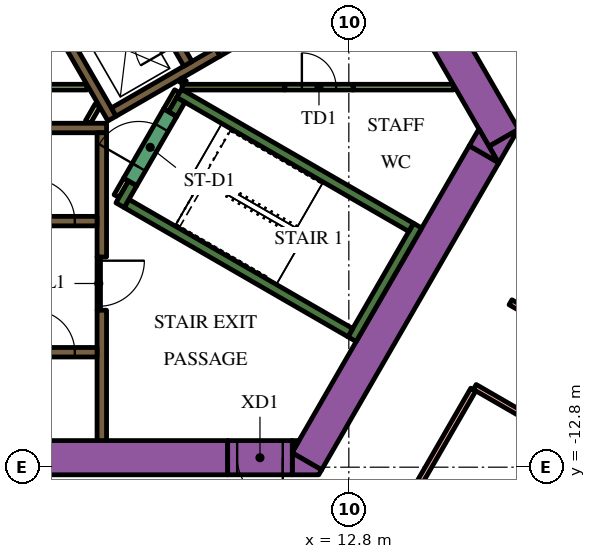
"""IFC4 building model, lengths in metres.
Left out: names, types, materials, properties, quantities, classifications, styles, units other than length and angle.
Written with IfcOpenShell. Run it as: python <this file> out.ifc"""

import sys

from ifc_helpers import new_model, si_unit, direction, frame, frame_2d, origin, place, context, subcontext, project, spatial, polyline, rectangle, outline, extrude, element, fill, save


model = new_model("IFC4")
c1 = context("Model", 3, precision=1e-05, world=origin(), true_north=direction((0.0, 1.0)))
c2 = subcontext(c1, "Body", "Model", "MODEL_VIEW")
j1 = project(units=[si_unit("LENGTHUNIT", "METRE"), si_unit("PLANEANGLEUNIT", "RADIAN")], contexts=[c1])
p1 = place(None, origin())
s1 = spatial("IfcSite", under=j1, at=p1, CompositionType="ELEMENT")
p2 = place(p1, origin())
s2 = spatial("IfcBuilding", under=s1, at=p2, CompositionType="ELEMENT")
p3 = place(p2, frame((0.0, 0.0, 134.4)))
s3 = spatial("IfcBuildingStorey", under=s2, at=p3, CompositionType="ELEMENT", Elevation=134.4)
p4 = place(p3, frame((6.776, 13.364, 0.0), z_axis=(0.0, 0.0, 1.0), x_axis=(0.500004177138, -0.8660229921, 0.0)))
e1 = element("IfcWall", 1, at=p4, inside=s3, PredefinedType="SOLIDWALL", context=c2, shape_type="SweptSolid", body=[
    extrude(rectangle(XDim=20.204, YDim=0.9, at=frame_2d((10.102, 0.0))), origin(), (0.0, 0.0, 1.0), 7.2),
])
p5 = place(p3, origin())
e2 = element("IfcWall", 2, at=p5, inside=s3, PredefinedType="SOLIDWALL", context=c2, shape_type="SweptSolid", body=[
    extrude(outline(polyline([(16.743, -4.8), (16.489, -4.36), (17.251, -3.92), (16.743, -4.8)])), origin(), (0.0, 0.0, 1.0), 7.2),
])
p6 = place(p3, frame((11.695, -12.644, 0.0), z_axis=(0.0, 0.0, 1.0), x_axis=(0.500010229568, 0.86601949766, 0.0)))
e3 = element("IfcWall", 3, at=p6, inside=s3, PredefinedType="SOLIDWALL", context=c2, shape_type="SweptSolid", body=[
    extrude(rectangle(XDim=9.326, YDim=0.9, at=frame_2d((4.663, 0.0))), origin(), (0.0, 0.0, 1.0), 7.2),
])
e4 = element("IfcWall", 4, at=p5, inside=s3, PredefinedType="SOLIDWALL", context=c2, shape_type="SweptSolid", body=[
    extrude(outline(polyline([(12.009, -13.0), (11.312, -13.0), (11.312, -12.425), (12.083, -12.871), (12.009, -13.0)])), origin(), (0.0, 0.0, 1.0), 7.2),
])
e5 = element("IfcWall", 5, at=p5, inside=s3, PredefinedType="SOLIDWALL", context=c2, shape_type="SweptSolid", body=[
    extrude(outline(polyline([(16.223, -3.9), (16.732, -4.78), (15.969, -4.34), (16.223, -3.9)])), origin(), (0.0, 0.0, 1.0), 7.2),
])
e6 = element("IfcWall", 6, at=p5, inside=s3, PredefinedType="SOLIDWALL", context=c2, shape_type="SweptSolid", body=[
    extrude(outline(polyline([(11.489, -12.1), (11.312, -12.407), (11.312, -12.1), (11.489, -12.1)])), origin(), (0.0, 0.0, 1.0), 7.2),
])
p7 = place(p3, frame((-12.019, -12.55, 0.0), z_axis=(0.0, 0.0, 1.0), x_axis=(1.0, 0.0, 0.0)))
e7 = element("IfcWall", 7, at=p7, inside=s3, PredefinedType="SOLIDWALL", context=c2, shape_type="SweptSolid", body=[
    extrude(rectangle(XDim=21.63, YDim=0.9, at=frame_2d((10.815, 0.0))), origin(), (0.0, 0.0, 1.0), 7.2),
])
p8 = place(p3, frame((12.885, -9.431, 0.0), z_axis=(0.0, 0.0, 1.0), x_axis=(0.500020560727, 0.866013532718, 0.0)))
e8 = element("IfcWall", 8, at=p8, inside=s3, PredefinedType="SOLIDWALL", context=c2, shape_type="SweptSolid", body=[
    extrude(rectangle(XDim=3.45, YDim=0.25, at=frame_2d((1.725, 0.0))), origin(), (0.0, 0.0, 1.0), 7.2),
])
p9 = place(p3, frame((12.84, -9.261, 0.0), z_axis=(0.0, 0.0, 1.0), x_axis=(-0.866013990052, 0.500019768644, 0.0)))
e9 = element("IfcWall", 9, at=p9, inside=s3, PredefinedType="SOLIDWALL", context=c2, shape_type="SweptSolid", body=[
    extrude(rectangle(XDim=6.8, YDim=0.25, at=frame_2d((3.4, 0.0))), origin(), (0.0, 0.0, 1.0), 7.2),
])
p10 = place(p3, frame((7.113, -5.33, 0.0), z_axis=(0.0, 0.0, 1.0), x_axis=(-0.499965889992, -0.866045096311, 0.0)))
e10 = element("IfcWall", 10, at=p10, inside=s3, PredefinedType="SOLIDWALL", context=c2, shape_type="SweptSolid", body=[
    extrude(rectangle(XDim=0.666, YDim=0.25, at=frame_2d((0.333, 0.0))), origin(), (0.0, 0.0, 1.0), 7.2),
])
p11 = place(p3, frame((8.334, -2.964, 0.0), z_axis=(0.0, 0.0, 1.0), x_axis=(0.866016039709, -0.500016218704, 0.0)))
e11 = element("IfcWall", 11, at=p11, inside=s3, PredefinedType="SOLIDWALL", context=c2, shape_type="SweptSolid", body=[
    extrude(rectangle(XDim=7.05, YDim=0.25, at=frame_2d((3.525, 0.0))), origin(), (0.0, 0.0, 1.0), 7.2),
])
p12 = place(p3, frame((8.163, -3.511, 0.0), z_axis=(0.0, 0.0, 1.0), x_axis=(0.500127794843, 0.865951608824, 0.0)))
e12 = element("IfcWall", 12, at=p12, inside=s3, PredefinedType="SOLIDWALL", context=c2, shape_type="SweptSolid", body=[
    extrude(rectangle(XDim=0.435, YDim=0.25, at=frame_2d((0.217, 0.0))), origin(), (0.0, 0.0, 1.0), 7.2),
])
p13 = place(p3, frame((-6.19, -3.875, 0.0), z_axis=(0.0, 0.0, 1.0), x_axis=(1.0, 0.0, 0.0)))
e13 = element("IfcWall", 13, at=p13, inside=s3, PredefinedType="SOLIDWALL", context=c2, shape_type="SweptSolid", body=[
    extrude(rectangle(XDim=12.615, YDim=0.25, at=frame_2d((6.307, 0.0))), origin(), (0.0, 0.0, 1.0), 7.2),
])
p14 = place(p3, frame((6.3, -8.67, 0.0), z_axis=(0.0, 0.0, 1.0), x_axis=(0.0, -1.0, 0.0)))
e14 = element("IfcWall", 14, at=p14, inside=s3, PredefinedType="SOLIDWALL", context=c2, shape_type="SweptSolid", body=[
    extrude(rectangle(XDim=3.43, YDim=0.25, at=frame_2d((1.715, 0.0))), origin(), (0.0, 0.0, 1.0), 7.2),
])
p15 = place(p3, frame((6.3, -7.268, 0.0), z_axis=(0.0, 0.0, 1.0), x_axis=(0.0, 1.0, 0.0)))
e15 = element("IfcWall", 15, at=p15, inside=s3, PredefinedType="SOLIDWALL", context=c2, shape_type="SweptSolid", body=[
    extrude(rectangle(XDim=3.268, YDim=0.25, at=frame_2d((1.634, 0.0))), origin(), (0.0, 0.0, 1.0), 7.2),
])
e16 = element("IfcWall", 16, at=p5, inside=s3, PredefinedType="SOLIDWALL", context=c2, shape_type="SweptSolid", body=[
    extrude(outline(polyline([(0.335, 6.925), (0.335, 6.925), (0.335, 7.075), (0.335, 7.075), (0.335, 7.075), (0.245, 7.075), (0.035, 7.439), (0.252, 7.564), (0.377, 7.348), (1.512, 5.382), (1.637, 5.165), (2.221, 4.153), (2.771, 3.199), (2.896, 2.983), (3.138, 2.564), (4.031, 1.017), (4.156, 0.801), (5.292, -1.165), (5.417, -1.382), (6.073, -2.519), (6.552, -3.348), (6.677, -3.564), (6.46, -3.689), (0.332, 6.925), (0.335, 6.925), (0.335, 6.925)])), origin(), (0.0, 0.0, 1.0), 7.2),
])
p16 = place(p3, frame((9.352, -1.875, 0.0), z_axis=(0.0, 0.0, 1.0), x_axis=(-0.866024844342, -0.500000968981, 0.0)))
e17 = element("IfcWall", 17, at=p16, inside=s3, PredefinedType="SOLIDWALL", context=c2, shape_type="SweptSolid", body=[
    extrude(rectangle(XDim=3.162, YDim=0.25, at=frame_2d((1.581, 0.0))), origin(), (0.0, 0.0, 1.0), 7.2),
])
p17 = place(p3, frame((6.688, -5.667, 0.0), z_axis=(0.0, 0.0, 1.0), x_axis=(0.499834152157, 0.86612113491, 0.0)))
e18 = element("IfcWall", 18, at=p17, inside=s3, PredefinedType="PARTITIONING", context=c2, shape_type="SweptSolid", body=[
    extrude(rectangle(XDim=0.505, YDim=0.15, at=frame_2d((0.252, 0.0))), origin(), (0.0, 0.0, 1.0), 6.15),
])
p18 = place(p3, frame((5.936, -3.718, 0.0), z_axis=(0.0, 0.0, 1.0), x_axis=(0.499890179513, 0.866088799389, 0.0)))
e19 = element("IfcWall", 19, at=p18, inside=s3, PredefinedType="PARTITIONING", context=c2, shape_type="SweptSolid", body=[
    extrude(rectangle(XDim=0.504, YDim=0.15, at=frame_2d((0.252, 0.0))), origin(), (0.0, 0.0, 1.0), 6.15),
])
p19 = place(p3, frame((8.412, -2.8, 0.0), z_axis=(0.0, 0.0, 1.0), x_axis=(1.0, 0.0, 0.0)))
e20 = element("IfcWall", 20, at=p19, inside=s3, PredefinedType="PARTITIONING", context=c2, shape_type="SweptSolid", body=[
    extrude(rectangle(XDim=2.702, YDim=0.15, at=frame_2d((1.351, 0.0))), origin(), (0.0, 0.0, 1.0), 7.2),
])
p20 = place(p3, frame((8.459, -2.599, 0.0), z_axis=(0.0, 0.0, 1.0), x_axis=(-0.501919277433, -0.864914469148, 0.0)))
e21 = element("IfcWall", 21, at=p20, inside=s3, PredefinedType="PARTITIONING", context=c2, shape_type="SweptSolid", body=[
    extrude(rectangle(XDim=0.109, YDim=0.15, at=frame_2d((0.054, 0.0))), origin(), (0.0, 0.0, 1.0), 7.2),
])
p21 = place(p3, frame((8.281, -2.907, 0.0), z_axis=(0.0, 0.0, 1.0), x_axis=(-0.500193841991, -0.86591346013, 0.0)))
e22 = element("IfcWall", 22, at=p21, inside=s3, PredefinedType="PARTITIONING", context=c2, shape_type="SweptSolid", body=[
    extrude(rectangle(XDim=0.583, YDim=0.15, at=frame_2d((0.292, 0.0))), origin(), (0.0, 0.0, 1.0), 7.2),
])
p22 = place(p3, frame((3.238, -2.8, 0.0), z_axis=(0.0, 0.0, 1.0), x_axis=(1.0, 0.0, 0.0)))
e23 = element("IfcWall", 23, at=p22, inside=s3, PredefinedType="PARTITIONING", context=c2, shape_type="SweptSolid", body=[
    extrude(rectangle(XDim=2.672, YDim=0.15, at=frame_2d((1.336, 0.0))), origin(), (0.0, 0.0, 1.0), 6.15),
])
p23 = place(p3, frame((12.915, -2.8, 0.0), z_axis=(0.0, 0.0, 1.0), x_axis=(1.0, 0.0, 0.0)))
e24 = element("IfcWall", 24, at=p23, inside=s3, PredefinedType="PARTITIONING", context=c2, shape_type="SweptSolid", body=[
    extrude(rectangle(XDim=2.637, YDim=0.15, at=frame_2d((1.318, 0.0))), origin(), (0.0, 0.0, 1.0), 6.15),
])
p24 = place(p3, frame((-6.175, -9.775, 0.0), z_axis=(0.0, 0.0, 1.0), x_axis=(1.0, 0.0, 0.0)))
e25 = element("IfcWall", 25, at=p24, inside=s3, PredefinedType="SOLIDWALL", context=c2, shape_type="SweptSolid", body=[
    extrude(rectangle(XDim=12.35, YDim=0.25, at=frame_2d((6.175, 0.0))), origin(), (0.0, 0.0, 1.0), 7.2),
])
p25 = place(p24, frame((0.585, 0.0, 0.0)))
e26 = element("IfcOpeningElement", 26, at=p25, cuts=e25, PredefinedType="OPENING", context=c2, shape_type="SweptSolid", body=[
    extrude(rectangle(XDim=1.1, YDim=2.1, at=frame_2d((0.55, 1.05))), frame((0.0, 0.135, 0.0), z_axis=(0.0, -1.0, 0.0), x_axis=(1.0, 0.0, 0.0)), (0.0, 0.0, 1.0), 0.27),
])
p26 = place(p24, frame((3.105, 0.0, 0.0)))
e27 = element("IfcOpeningElement", 27, at=p26, cuts=e25, PredefinedType="OPENING", context=c2, shape_type="SweptSolid", body=[
    extrude(rectangle(XDim=1.1, YDim=2.1, at=frame_2d((0.55, 1.05))), frame((0.0, 0.135, 0.0), z_axis=(0.0, -1.0, 0.0), x_axis=(1.0, 0.0, 0.0)), (0.0, 0.0, 1.0), 0.27),
])
p27 = place(p24, frame((5.625, 0.0, 0.0)))
e28 = element("IfcOpeningElement", 28, at=p27, cuts=e25, PredefinedType="OPENING", context=c2, shape_type="SweptSolid", body=[
    extrude(rectangle(XDim=1.1, YDim=2.1, at=frame_2d((0.55, 1.05))), frame((0.0, 0.135, 0.0), z_axis=(0.0, -1.0, 0.0), x_axis=(1.0, 0.0, 0.0)), (0.0, 0.0, 1.0), 0.27),
])
p28 = place(p24, frame((8.145, 0.0, 0.0)))
e29 = element("IfcOpeningElement", 29, at=p28, cuts=e25, PredefinedType="OPENING", context=c2, shape_type="SweptSolid", body=[
    extrude(rectangle(XDim=1.1, YDim=2.1, at=frame_2d((0.55, 1.05))), frame((0.0, 0.135, 0.0), z_axis=(0.0, -1.0, 0.0), x_axis=(1.0, 0.0, 0.0)), (0.0, 0.0, 1.0), 0.27),
])
p29 = place(p24, frame((10.665, 0.0, 0.0)))
e30 = element("IfcOpeningElement", 30, at=p29, cuts=e25, PredefinedType="OPENING", context=c2, shape_type="SweptSolid", body=[
    extrude(rectangle(XDim=1.1, YDim=2.1, at=frame_2d((0.55, 1.05))), frame((0.0, 0.135, 0.0), z_axis=(0.0, -1.0, 0.0), x_axis=(1.0, 0.0, 0.0)), (0.0, 0.0, 1.0), 0.27),
])
p30 = place(p3, frame((-6.175, -6.325, 0.0), z_axis=(0.0, 0.0, 1.0), x_axis=(1.0, 0.0, 0.0)))
e31 = element("IfcWall", 31, at=p30, inside=s3, PredefinedType="SOLIDWALL", context=c2, shape_type="SweptSolid", body=[
    extrude(rectangle(XDim=12.35, YDim=0.25, at=frame_2d((6.175, 0.0))), origin(), (0.0, 0.0, 1.0), 7.2),
])
p31 = place(p30, frame((0.585, 0.0, 0.0)))
e32 = element("IfcOpeningElement", 32, at=p31, cuts=e31, PredefinedType="OPENING", context=c2, shape_type="SweptSolid", body=[
    extrude(rectangle(XDim=1.1, YDim=2.1, at=frame_2d((0.55, 1.05))), frame((0.0, 0.135, 0.0), z_axis=(0.0, -1.0, 0.0), x_axis=(1.0, 0.0, 0.0)), (0.0, 0.0, 1.0), 0.27),
])
p32 = place(p30, frame((3.105, 0.0, 0.0)))
e33 = element("IfcOpeningElement", 33, at=p32, cuts=e31, PredefinedType="OPENING", context=c2, shape_type="SweptSolid", body=[
    extrude(rectangle(XDim=1.1, YDim=2.1, at=frame_2d((0.55, 1.05))), frame((0.0, 0.135, 0.0), z_axis=(0.0, -1.0, 0.0), x_axis=(1.0, 0.0, 0.0)), (0.0, 0.0, 1.0), 0.27),
])
p33 = place(p30, frame((5.625, 0.0, 0.0)))
e34 = element("IfcOpeningElement", 34, at=p33, cuts=e31, PredefinedType="OPENING", context=c2, shape_type="SweptSolid", body=[
    extrude(rectangle(XDim=1.1, YDim=2.1, at=frame_2d((0.55, 1.05))), frame((0.0, 0.135, 0.0), z_axis=(0.0, -1.0, 0.0), x_axis=(1.0, 0.0, 0.0)), (0.0, 0.0, 1.0), 0.27),
])
p34 = place(p30, frame((8.145, 0.0, 0.0)))
e35 = element("IfcOpeningElement", 35, at=p34, cuts=e31, PredefinedType="OPENING", context=c2, shape_type="SweptSolid", body=[
    extrude(rectangle(XDim=1.1, YDim=2.1, at=frame_2d((0.55, 1.05))), frame((0.0, 0.135, 0.0), z_axis=(0.0, -1.0, 0.0), x_axis=(1.0, 0.0, 0.0)), (0.0, 0.0, 1.0), 0.27),
])
p35 = place(p30, frame((10.665, 0.0, 0.0)))
e36 = element("IfcOpeningElement", 36, at=p35, cuts=e31, PredefinedType="OPENING", context=c2, shape_type="SweptSolid", body=[
    extrude(rectangle(XDim=1.1, YDim=2.1, at=frame_2d((0.55, 1.05))), frame((0.0, 0.135, 0.0), z_axis=(0.0, -1.0, 0.0), x_axis=(1.0, 0.0, 0.0)), (0.0, 0.0, 1.0), 0.27),
])
p36 = place(p3, frame((8.565, -2.185, 0.0), z_axis=(0.0, 0.0, 1.0), x_axis=(-0.499997954832, 0.866026584559, 0.0)))
e37 = element("IfcWall", 37, at=p36, inside=s3, PredefinedType="SOLIDWALL", context=c2, shape_type="SweptSolid", body=[
    extrude(rectangle(XDim=12.35, YDim=0.25, at=frame_2d((6.175, 0.0))), origin(), (0.0, 0.0, 1.0), 7.2),
])
p37 = place(p36, frame((0.585, 0.0, 0.0)))
e38 = element("IfcOpeningElement", 38, at=p37, cuts=e37, PredefinedType="OPENING", context=c2, shape_type="SweptSolid", body=[
    extrude(rectangle(XDim=1.1, YDim=2.1, at=frame_2d((0.55, 1.05))), frame((0.0, 0.135, 0.0), z_axis=(0.0, -1.0, 0.0), x_axis=(1.0, 0.0, 0.0)), (0.0, 0.0, 1.0), 0.27),
])
p38 = place(p36, frame((3.105, 0.0, 0.0)))
e39 = element("IfcOpeningElement", 39, at=p38, cuts=e37, PredefinedType="OPENING", context=c2, shape_type="SweptSolid", body=[
    extrude(rectangle(XDim=1.1, YDim=2.1, at=frame_2d((0.55, 1.05))), frame((0.0, 0.135, 0.0), z_axis=(0.0, -1.0, 0.0), x_axis=(1.0, 0.0, 0.0)), (0.0, 0.0, 1.0), 0.27),
])
p39 = place(p36, frame((5.625, 0.0, 0.0)))
e40 = element("IfcOpeningElement", 40, at=p39, cuts=e37, PredefinedType="OPENING", context=c2, shape_type="SweptSolid", body=[
    extrude(rectangle(XDim=1.1, YDim=2.1, at=frame_2d((0.55, 1.05))), frame((0.0, 0.135, 0.0), z_axis=(0.0, -1.0, 0.0), x_axis=(1.0, 0.0, 0.0)), (0.0, 0.0, 1.0), 0.27),
])
p40 = place(p36, frame((8.145, 0.0, 0.0)))
e41 = element("IfcOpeningElement", 41, at=p40, cuts=e37, PredefinedType="OPENING", context=c2, shape_type="SweptSolid", body=[
    extrude(rectangle(XDim=1.1, YDim=2.1, at=frame_2d((0.55, 1.05))), frame((0.0, 0.135, 0.0), z_axis=(0.0, -1.0, 0.0), x_axis=(1.0, 0.0, 0.0)), (0.0, 0.0, 1.0), 0.27),
])
p41 = place(p36, frame((10.665, 0.0, 0.0)))
e42 = element("IfcOpeningElement", 42, at=p41, cuts=e37, PredefinedType="OPENING", context=c2, shape_type="SweptSolid", body=[
    extrude(rectangle(XDim=1.1, YDim=2.1, at=frame_2d((0.55, 1.05))), frame((0.0, 0.135, 0.0), z_axis=(0.0, -1.0, 0.0), x_axis=(1.0, 0.0, 0.0)), (0.0, 0.0, 1.0), 0.27),
])
p42 = place(p3, frame((7.048, -5.292, 0.0), z_axis=(0.0, 0.0, 1.0), x_axis=(0.49994051562, 0.866059744384, 0.0)))
e43 = element("IfcWall", 43, at=p42, inside=s3, PredefinedType="SOLIDWALL", context=c2, shape_type="SweptSolid", body=[
    extrude(rectangle(XDim=2.1, YDim=0.4, at=frame_2d((1.05, 0.0))), origin(), (0.0, 0.0, 1.0), 7.2),
])
p43 = place(p42, frame((0.45, 0.0, 0.0)))
e44 = element("IfcOpeningElement", 44, at=p43, cuts=e43, PredefinedType="OPENING", context=c2, shape_type="SweptSolid", body=[
    extrude(rectangle(XDim=1.2, YDim=2.1, at=frame_2d((0.6, 1.05))), frame((0.0, 0.21, 0.0), z_axis=(0.0, -1.0, 0.0), x_axis=(1.0, 0.0, 0.0)), (0.0, 0.0, 1.0), 0.42),
])
p44 = place(p3, frame((6.22, -7.266, 0.0), z_axis=(0.0, 0.0, 1.0), x_axis=(0.0, -1.0, 0.0)))
e45 = element("IfcWall", 45, at=p44, inside=s3, PredefinedType="PARTITIONING", context=c2, shape_type="SweptSolid", body=[
    extrude(rectangle(XDim=1.4, YDim=0.09, at=frame_2d((0.7, 0.0))), origin(), (0.0, 0.0, 1.0), 6.15),
])
p45 = place(p44, frame((0.1, 0.0, 0.0)))
e46 = element("IfcOpeningElement", 46, at=p45, cuts=e45, PredefinedType="OPENING", context=c2, shape_type="SweptSolid", body=[
    extrude(rectangle(XDim=1.2, YDim=2.1, at=frame_2d((0.6, 1.05))), frame((0.0, 0.055, 0.0), z_axis=(0.0, -1.0, 0.0), x_axis=(1.0, 0.0, 0.0)), (0.0, 0.0, 1.0), 0.11),
])
p46 = place(p3, frame((11.312, -12.55, 0.0), z_axis=(0.0, 0.0, 1.0), x_axis=(-1.0, 0.0, 0.0)))
e47 = element("IfcWall", 47, at=p46, inside=s3, PredefinedType="SOLIDWALL", context=c2, shape_type="SweptSolid", body=[
    extrude(rectangle(XDim=1.7, YDim=0.9, at=frame_2d((0.85, 0.0))), origin(), (0.0, 0.0, 1.0), 7.2),
])
p47 = place(p46, frame((0.25, 0.0, 0.0)))
e48 = element("IfcOpeningElement", 48, at=p47, cuts=e47, PredefinedType="OPENING", context=c2, shape_type="SweptSolid", body=[
    extrude(rectangle(XDim=1.2, YDim=2.1, at=frame_2d((0.6, 1.05))), frame((0.0, 0.46, 0.0), z_axis=(0.0, -1.0, 0.0), x_axis=(1.0, 0.0, 0.0)), (0.0, 0.0, 1.0), 0.92),
])
p48 = place(p3, frame((9.352, -1.875, 0.0), z_axis=(0.0, 0.0, 1.0), x_axis=(0.865989075817, 0.500062916607, 0.0)))
e49 = element("IfcWall", 49, at=p48, inside=s3, PredefinedType="SOLIDWALL", context=c2, shape_type="SweptSolid", body=[
    extrude(rectangle(XDim=1.8, YDim=0.25, at=frame_2d((0.9, 0.0))), origin(), (0.0, 0.0, 1.0), 7.2),
])
p49 = place(p48, frame((0.45, 0.0, 0.0)))
e50 = element("IfcOpeningElement", 50, at=p49, cuts=e49, PredefinedType="OPENING", context=c2, shape_type="SweptSolid", body=[
    extrude(rectangle(XDim=0.9, YDim=2.1, at=frame_2d((0.45, 1.05))), frame((0.0, 0.135, 0.0), z_axis=(0.0, -1.0, 0.0), x_axis=(1.0, 0.0, 0.0)), (0.0, 0.0, 1.0), 0.27),
])
p50 = place(p3, frame((11.115, -2.8, 0.0), z_axis=(0.0, 0.0, 1.0), x_axis=(1.0, 0.0, 0.0)))
e51 = element("IfcWall", 51, at=p50, inside=s3, PredefinedType="PARTITIONING", context=c2, shape_type="SweptSolid", body=[
    extrude(rectangle(XDim=1.8, YDim=0.15, at=frame_2d((0.9, 0.0))), origin(), (0.0, 0.0, 1.0), 6.15),
])
p51 = place(p50, frame((0.45, 0.0, 0.0)))
e52 = element("IfcOpeningElement", 52, at=p51, cuts=e51, PredefinedType="OPENING", context=c2, shape_type="SweptSolid", body=[
    extrude(rectangle(XDim=0.9, YDim=2.1, at=frame_2d((0.45, 1.05))), frame((0.0, 0.085, 0.0), z_axis=(0.0, -1.0, 0.0), x_axis=(1.0, 0.0, 0.0)), (0.0, 0.0, 1.0), 0.17),
])
p52 = place(p3, frame((20.034, -3.9, 0.0), z_axis=(0.0, 0.0, 1.0), x_axis=(-0.500006098403, 0.866021882841, 0.0)))
e53 = element("IfcWall", 53, at=p52, inside=s3, PredefinedType="PARTITIONING", context=c2, shape_type="SweptSolid", body=[
    extrude(rectangle(XDim=22.774, YDim=0.15, at=frame_2d((11.387, 0.0))), origin(), (0.0, 0.0, 1.0), 6.15),
])
p53 = place(p52, frame((10.487, 0.0, 0.0)))
e54 = element("IfcOpeningElement", 54, at=p53, cuts=e53, PredefinedType="OPENING", context=c2, shape_type="SweptSolid", body=[
    extrude(rectangle(XDim=1.8, YDim=2.1, at=frame_2d((0.9, 1.05))), frame((0.0, 0.085, 0.0), z_axis=(0.0, -1.0, 0.0), x_axis=(1.0, 0.0, 0.0)), (0.0, 0.0, 1.0), 0.17),
])
p54 = place(p52, frame((7.377, 0.0, 0.0)))
e55 = element("IfcOpeningElement", 55, at=p54, cuts=e53, PredefinedType="OPENING", context=c2, shape_type="SweptSolid", body=[
    extrude(rectangle(XDim=1.8, YDim=2.1, at=frame_2d((0.9, 1.05))), frame((0.0, 0.085, 0.0), z_axis=(0.0, -1.0, 0.0), x_axis=(1.0, 0.0, 0.0)), (0.0, 0.0, 1.0), 0.17),
])
p55 = place(p3, frame((16.114, -10.689, 0.0), z_axis=(0.0, 0.0, 1.0), x_axis=(0.866025427251, -0.499999959354, 0.0)))
e56 = element("IfcWall", 56, at=p55, inside=s3, PredefinedType="PARTITIONING", context=c2, shape_type="SweptSolid", body=[
    extrude(rectangle(XDim=13.099, YDim=0.15, at=frame_2d((6.549, 0.0))), origin(), (0.0, 0.0, 1.0), 6.15),
])
p56 = place(p55, frame((5.649, 0.0, 0.0)))
e57 = element("IfcOpeningElement", 57, at=p56, cuts=e56, PredefinedType="OPENING", context=c2, shape_type="SweptSolid", body=[
    extrude(rectangle(XDim=1.8, YDim=2.1, at=frame_2d((0.9, 1.05))), frame((0.0, 0.085, 0.0), z_axis=(0.0, -1.0, 0.0), x_axis=(1.0, 0.0, 0.0)), (0.0, 0.0, 1.0), 0.17),
])
p57 = place(p3, frame((17.054, -8.461, 0.0), z_axis=(0.0, 0.0, 1.0), x_axis=(0.866019909064, -0.500009517014, 0.0)))
e58 = element("IfcWall", 58, at=p57, inside=s3, PredefinedType="PARTITIONING", context=c2, shape_type="SweptSolid", body=[
    extrude(rectangle(XDim=13.399, YDim=0.15, at=frame_2d((6.699, 0.0))), origin(), (0.0, 0.0, 1.0), 6.15),
])
p58 = place(p3, frame((16.074, -10.759, 0.0), z_axis=(0.0, 0.0, 1.0), x_axis=(-0.499999796116, -0.866025521497, 0.0)))
e59 = element("IfcWall", 59, at=p58, inside=s3, PredefinedType="PARTITIONING", context=c2, shape_type="SweptSolid", body=[
    extrude(rectangle(XDim=5.359, YDim=0.15, at=frame_2d((2.68, 0.0))), origin(), (0.0, 0.0, 1.0), 6.15),
])
p59 = place(p29, origin())
e60 = element("IfcDoor", 60, at=p59, inside=s3, OperationType="DOUBLE_DOOR_SLIDING", PredefinedType="DOOR", context=c2, shape_type="SweptSolid", body=[
    extrude(rectangle(XDim=1.1, YDim=2.1, at=frame_2d((0.55, 1.05))), frame((0.0, 0.025, 0.0), z_axis=(0.0, -1.0, 0.0), x_axis=(1.0, 0.0, 0.0)), (0.0, 0.0, 1.0), 0.05),
])
fill(e30, e60)
p60 = place(p35, origin())
e61 = element("IfcDoor", 61, at=p60, inside=s3, OperationType="DOUBLE_DOOR_SLIDING", PredefinedType="DOOR", context=c2, shape_type="SweptSolid", body=[
    extrude(rectangle(XDim=1.1, YDim=2.1, at=frame_2d((0.55, 1.05))), frame((0.0, 0.025, 0.0), z_axis=(0.0, -1.0, 0.0), x_axis=(1.0, 0.0, 0.0)), (0.0, 0.0, 1.0), 0.05),
])
fill(e36, e61)
p61 = place(p43, origin())
e62 = element("IfcDoor", 62, at=p61, inside=s3, OperationType="SINGLE_SWING_LEFT", PredefinedType="DOOR", context=c2, shape_type="SweptSolid", body=[
    extrude(rectangle(XDim=1.2, YDim=2.1, at=frame_2d((0.6, 1.05))), frame((0.0, 0.025, 0.0), z_axis=(0.0, -1.0, 0.0), x_axis=(1.0, 0.0, 0.0)), (0.0, 0.0, 1.0), 0.05),
])
fill(e44, e62)
p62 = place(p45, origin())
e63 = element("IfcDoor", 63, at=p62, inside=s3, OperationType="SINGLE_SWING_LEFT", PredefinedType="DOOR", context=c2, shape_type="SweptSolid", body=[
    extrude(rectangle(XDim=1.2, YDim=2.1, at=frame_2d((0.6, 1.05))), frame((0.0, 0.025, 0.0), z_axis=(0.0, -1.0, 0.0), x_axis=(1.0, 0.0, 0.0)), (0.0, 0.0, 1.0), 0.05),
])
fill(e46, e63)
p63 = place(p47, origin())
e64 = element("IfcDoor", 64, at=p63, inside=s3, OperationType="SINGLE_SWING_LEFT", PredefinedType="DOOR", context=c2, shape_type="SweptSolid", body=[
    extrude(rectangle(XDim=1.2, YDim=2.1, at=frame_2d((0.6, 1.05))), frame((0.0, 0.025, 0.0), z_axis=(0.0, -1.0, 0.0), x_axis=(1.0, 0.0, 0.0)), (0.0, 0.0, 1.0), 0.05),
])
fill(e48, e64)
p64 = place(p51, origin())
e65 = element("IfcDoor", 65, at=p64, inside=s3, OperationType="SINGLE_SWING_LEFT", PredefinedType="DOOR", context=c2, shape_type="SweptSolid", body=[
    extrude(rectangle(XDim=0.9, YDim=2.1, at=frame_2d((0.45, 1.05))), frame((0.0, 0.025, 0.0), z_axis=(0.0, -1.0, 0.0), x_axis=(1.0, 0.0, 0.0)), (0.0, 0.0, 1.0), 0.05),
])
fill(e52, e65)
save(model, sys.argv[1])
